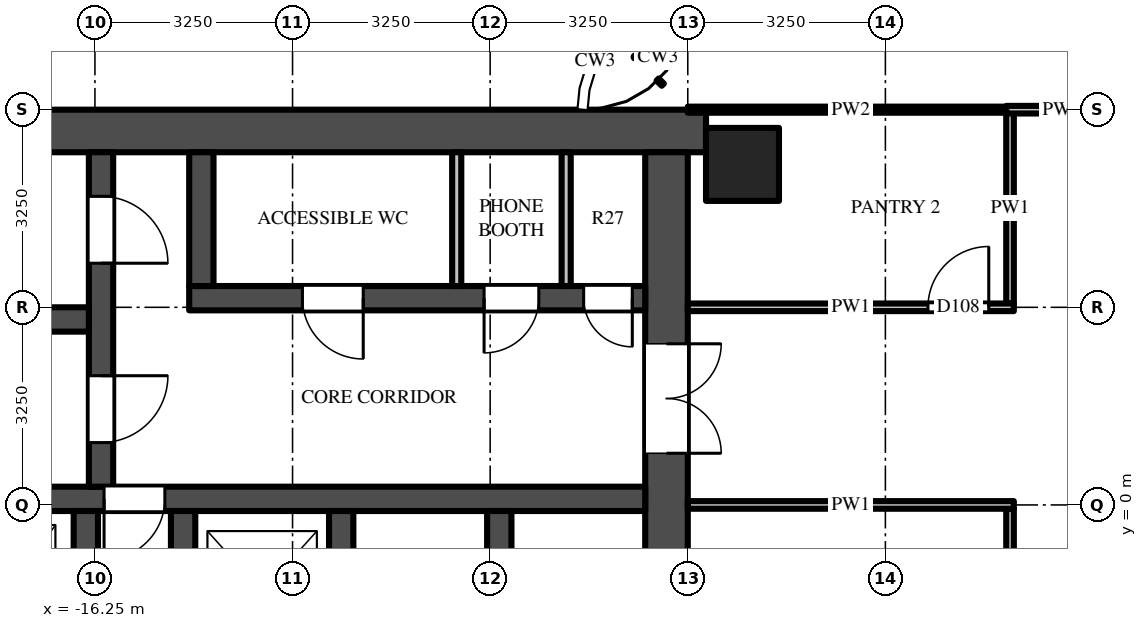
"""IFC4 building model, lengths in metres.
Left out: names, types, materials, properties, quantities, classifications, styles, units other than length and angle.
Written with IfcOpenShell. Run it as: python <this file> out.ifc"""

import sys

from ifc_helpers import new_model, si_unit, direction, frame, frame_2d, origin, origin_2d, place, context, subcontext, project, spatial, rectangle, extrude, source, transform, mapped, element, fill, save


model = new_model("IFC4")
c1 = context("Model", 3, precision=1e-05, world=origin(), true_north=direction((0.0, 1.0)))
c2 = subcontext(c1, "Body", "Model", "MODEL_VIEW")
j1 = project(units=[si_unit("LENGTHUNIT", "METRE"), si_unit("PLANEANGLEUNIT", "RADIAN")], contexts=[c1])
p1 = place(None, origin())
s1 = spatial("IfcSite", under=j1, at=p1, CompositionType="ELEMENT")
p2 = place(p1, origin())
s2 = spatial("IfcBuilding", under=s1, at=p2, CompositionType="ELEMENT")
p3 = place(p2, frame((0.0, 0.0, 185.4)))
s3 = spatial("IfcBuildingStorey", under=s2, at=p3, CompositionType="ELEMENT", Elevation=185.4)
m1 = source(origin(), c2, "Body", "SweptSolid", [
    extrude(rectangle(XDim=1.2, YDim=1.2, at=origin_2d()), origin(), (0.0, 0.0, 1.0), 3.9),
])
p4 = place(p3, frame((-5.6, 5.6, 0.0), z_axis=(0.0, 0.0, 1.0), x_axis=(1.0, 0.0, 0.0)))
e1 = element("IfcColumn", 1, at=p4, inside=s3, PredefinedType="COLUMN", context=c2, shape_type="MappedRepresentation", body=[
    mapped(m1, transform((0.0, 0.0, 0.0))),
])
m2 = source(origin(), c2, "Body", "SweptSolid", [
    extrude(rectangle(XDim=16.55, YDim=0.7, at=frame_2d((8.275, 0.0))), origin(), (0.0, 0.0, 1.0), 3.7),
])
p5 = place(p3, frame((-6.2, 6.15, 0.0), z_axis=(0.0, 0.0, 1.0), x_axis=(-1.0, 0.0, 0.0)))
e2 = element("IfcWall", 2, at=p5, inside=s3, PredefinedType="SHEAR", context=c2, shape_type="MappedRepresentation", body=[
    mapped(m2, transform((0.0, 0.0, 0.0))),
])
m3 = source(origin(), c2, "Body", "SweptSolid", [
    extrude(rectangle(XDim=9.05, YDim=0.7, at=frame_2d((4.525, 0.0))), origin(), (0.0, 0.0, 1.0), 3.7),
])
p6 = place(p3, frame((-6.85, 5.8, 0.0), z_axis=(0.0, 0.0, 1.0), x_axis=(0.0, -1.0, 0.0)))
e3 = element("IfcWall", 3, at=p6, inside=s3, PredefinedType="SHEAR", context=c2, shape_type="MappedRepresentation", body=[
    mapped(m3, transform((0.0, 0.0, 0.0))),
])
m4 = source(origin(), c2, "Body", "SweptSolid", [
    extrude(rectangle(XDim=1.8, YDim=2.1, at=frame_2d((0.9, 1.05))), frame((0.0, 0.36, 0.0), z_axis=(0.0, -1.0, 0.0), x_axis=(1.0, 0.0, 0.0)), (0.0, 0.0, 1.0), 0.72),
])
p7 = place(p6, frame((3.15, 0.0, 0.0)))
e4 = element("IfcOpeningElement", 4, at=p7, cuts=e3, PredefinedType="OPENING", context=c2, shape_type="MappedRepresentation", body=[
    mapped(m4, transform((0.0, 0.0, 0.0))),
])
m5 = source(origin(), c2, "Body", "SweptSolid", [
    extrude(rectangle(XDim=7.5, YDim=0.4, at=frame_2d((3.75, 0.0))), origin(), (0.0, 0.0, 1.0), 3.7),
])
p8 = place(p3, frame((-7.2, 3.4, 0.0), z_axis=(0.0, 0.0, 1.0), x_axis=(-1.0, 0.0, 0.0)))
e5 = element("IfcWall", 5, at=p8, inside=s3, PredefinedType="SHEAR", context=c2, shape_type="MappedRepresentation", body=[
    mapped(m5, transform((0.0, 0.0, 0.0))),
])
m6 = source(origin(), c2, "Body", "SweptSolid", [
    extrude(rectangle(XDim=0.8, YDim=2.1, at=frame_2d((0.4, 1.05))), frame((0.0, 0.21, 0.0), z_axis=(0.0, -1.0, 0.0), x_axis=(1.0, 0.0, 0.0)), (0.0, 0.0, 1.0), 0.42),
])
p9 = place(p8, frame((0.212, 0.0, 0.0)))
e6 = element("IfcOpeningElement", 6, at=p9, cuts=e5, PredefinedType="OPENING", context=c2, shape_type="MappedRepresentation", body=[
    mapped(m6, transform((0.0, 0.0, 0.0))),
])
m7 = source(origin(), c2, "Body", "SweptSolid", [
    extrude(rectangle(XDim=0.9, YDim=2.1, at=frame_2d((0.45, 1.05))), frame((0.0, 0.21, 0.0), z_axis=(0.0, -1.0, 0.0), x_axis=(1.0, 0.0, 0.0)), (0.0, 0.0, 1.0), 0.42),
])
p10 = place(p8, frame((1.75, 0.0, 0.0)))
e7 = element("IfcOpeningElement", 7, at=p10, cuts=e5, PredefinedType="OPENING", context=c2, shape_type="MappedRepresentation", body=[
    mapped(m7, transform((0.0, 0.0, 0.0))),
])
m8 = source(origin(), c2, "Body", "SweptSolid", [
    extrude(rectangle(XDim=1.0, YDim=2.1, at=frame_2d((0.5, 1.05))), frame((0.0, 0.21, 0.0), z_axis=(0.0, -1.0, 0.0), x_axis=(1.0, 0.0, 0.0)), (0.0, 0.0, 1.0), 0.42),
])
p11 = place(p8, frame((4.637, 0.0, 0.0)))
e8 = element("IfcOpeningElement", 8, at=p11, cuts=e5, PredefinedType="OPENING", context=c2, shape_type="MappedRepresentation", body=[
    mapped(m8, transform((0.0, 0.0, 0.0))),
])
m9 = source(origin(), c2, "Body", "SweptSolid", [
    extrude(rectangle(XDim=14.85, YDim=0.4, at=frame_2d((7.425, 0.0))), origin(), (0.0, 0.0, 1.0), 3.7),
])
p12 = place(p3, frame((-7.2, 0.1, 0.0), z_axis=(0.0, 0.0, 1.0), x_axis=(-1.0, 0.0, 0.0)))
e9 = element("IfcWall", 9, at=p12, inside=s3, PredefinedType="SHEAR", context=c2, shape_type="MappedRepresentation", body=[
    mapped(m9, transform((0.0, 0.0, 0.0))),
])
p13 = place(p12, frame((7.9, 0.0, 0.0)))
e10 = element("IfcOpeningElement", 10, at=p13, cuts=e9, PredefinedType="OPENING", context=c2, shape_type="MappedRepresentation", body=[
    mapped(m8, transform((0.0, 0.0, 0.0))),
])
m10 = source(origin(), c2, "Body", "SweptSolid", [
    extrude(rectangle(XDim=5.5, YDim=0.4, at=frame_2d((2.75, 0.0))), origin(), (0.0, 0.0, 1.0), 3.7),
])
p14 = place(p3, frame((-16.15, 5.8, 0.0), z_axis=(0.0, 0.0, 1.0), x_axis=(0.0, -1.0, 0.0)))
e11 = element("IfcWall", 11, at=p14, inside=s3, PredefinedType="SHEAR", context=c2, shape_type="MappedRepresentation", body=[
    mapped(m10, transform((0.0, 0.0, 0.0))),
])
m11 = source(origin(), c2, "Body", "SweptSolid", [
    extrude(rectangle(XDim=1.1, YDim=2.1, at=frame_2d((0.55, 1.05))), frame((0.0, 0.21, 0.0), z_axis=(0.0, -1.0, 0.0), x_axis=(1.0, 0.0, 0.0)), (0.0, 0.0, 1.0), 0.42),
])
p15 = place(p14, frame((0.725, 0.0, 0.0)))
e12 = element("IfcOpeningElement", 12, at=p15, cuts=e11, PredefinedType="OPENING", context=c2, shape_type="MappedRepresentation", body=[
    mapped(m11, transform((0.0, 0.0, 0.0))),
])
p16 = place(p14, frame((3.675, 0.0, 0.0)))
e13 = element("IfcOpeningElement", 13, at=p16, cuts=e11, PredefinedType="OPENING", context=c2, shape_type="MappedRepresentation", body=[
    mapped(m11, transform((0.0, 0.0, 0.0))),
])
m12 = source(origin(), c2, "Body", "SweptSolid", [
    extrude(rectangle(XDim=5.7, YDim=0.4, at=frame_2d((2.85, 0.0))), origin(), (0.0, 0.0, 1.0), 3.7),
])
p17 = place(p3, frame((-16.35, 3.05, 0.0), z_axis=(0.0, 0.0, 1.0), x_axis=(-1.0, 0.0, 0.0)))
e14 = element("IfcWall", 14, at=p17, inside=s3, PredefinedType="SHEAR", context=c2, shape_type="MappedRepresentation", body=[
    mapped(m12, transform((0.0, 0.0, 0.0))),
])
m13 = source(origin(), c2, "Body", "SweptSolid", [
    extrude(rectangle(XDim=2.2, YDim=0.4, at=frame_2d((1.1, 0.0))), origin(), (0.0, 0.0, 1.0), 3.7),
])
p18 = place(p3, frame((-14.5, 5.8, 0.0), z_axis=(0.0, 0.0, 1.0), x_axis=(0.0, -1.0, 0.0)))
e15 = element("IfcWall", 15, at=p18, inside=s3, PredefinedType="SHEAR", context=c2, shape_type="MappedRepresentation", body=[
    mapped(m13, transform((0.0, 0.0, 0.0))),
])
m14 = source(origin(), c2, "Body", "SweptSolid", [
    extrude(rectangle(XDim=2.45, YDim=0.4, at=frame_2d((1.225, 0.0))), origin(), (0.0, 0.0, 1.0), 3.7),
])
for number, where, z_axis, x_axis in (
    (16, (-9.6, -0.1, 0.0), (0.0, 0.0, 1.0), (0.0, -1.0, 0.0)),
    (17, (-12.2, -0.1, 0.0), (0.0, 0.0, 1.0), (0.0, -1.0, 0.0)),
    (18, (-14.8, -0.1, 0.0), (0.0, 0.0, 1.0), (0.0, -1.0, 0.0)),
    (19, (-16.4, -0.1, 0.0), (0.0, 0.0, 1.0), (0.0, -1.0, 0.0)),
):
    element("IfcWall", number, at=place(p3, frame(where, z_axis=z_axis, x_axis=x_axis)), inside=s3, PredefinedType="SHEAR", context=c2, shape_type="MappedRepresentation", body=[
        mapped(m14, transform((0.0, 0.0, 0.0))),
    ])
m15 = source(origin(), c2, "Body", "SweptSolid", [
    extrude(rectangle(XDim=2.2, YDim=0.15, at=frame_2d((1.1, 0.0))), origin(), (0.0, 0.0, 1.0), 3.7),
])
for number, where, z_axis, x_axis in (
    (20, (-8.5, 5.8, 0.0), (0.0, 0.0, 1.0), (0.0, -1.0, 0.0)),
    (21, (-10.3, 5.8, 0.0), (0.0, 0.0, 1.0), (0.0, -1.0, 0.0)),
):
    element("IfcWall", number, at=place(p3, frame(where, z_axis=z_axis, x_axis=x_axis)), inside=s3, PredefinedType="PARTITIONING", context=c2, shape_type="MappedRepresentation", body=[
        mapped(m15, transform((0.0, 0.0, 0.0))),
    ])
m16 = source(origin(), c2, "Body", "SweptSolid", [
    extrude(rectangle(XDim=3.125, YDim=0.125, at=frame_2d((1.562, 0.0))), origin(), (0.0, 0.0, 1.0), 3.068),
])
p19 = place(p3, frame((-1.2, -0.062, 0.0), z_axis=(0.0, 0.0, 1.0), x_axis=(0.0, -1.0, 0.0)))
e22 = element("IfcWall", 22, at=p19, inside=s3, PredefinedType="PARTITIONING", context=c2, shape_type="MappedRepresentation", body=[
    mapped(m16, transform((0.0, 0.0, 0.0))),
])
m17 = source(origin(), c2, "Body", "SweptSolid", [
    extrude(rectangle(XDim=3.137, YDim=0.125, at=frame_2d((1.569, 0.0))), origin(), (0.0, 0.0, 1.0), 2.997),
])
p20 = place(p3, frame((-1.2, 6.45, 0.0), z_axis=(0.0, 0.0, 1.0), x_axis=(0.0, -1.0, 0.0)))
e23 = element("IfcWall", 23, at=p20, inside=s3, PredefinedType="PARTITIONING", context=c2, shape_type="MappedRepresentation", body=[
    mapped(m17, transform((0.0, 0.0, 0.0))),
])
m18 = source(origin(), c2, "Body", "SweptSolid", [
    extrude(rectangle(XDim=5.363, YDim=0.125, at=frame_2d((2.681, 0.0))), origin(), (0.0, 0.0, 1.0), 2.997),
])
p21 = place(p3, frame((-1.137, 0.0, 0.0), z_axis=(0.0, 0.0, 1.0), x_axis=(-1.0, 0.0, 0.0)))
e24 = element("IfcWall", 24, at=p21, inside=s3, PredefinedType="PARTITIONING", context=c2, shape_type="MappedRepresentation", body=[
    mapped(m18, transform((0.0, 0.0, 0.0))),
])
p22 = place(p3, frame((-6.5, 3.25, 0.0), z_axis=(0.0, 0.0, 1.0), x_axis=(1.0, 0.0, 0.0)))
e25 = element("IfcWall", 25, at=p22, inside=s3, PredefinedType="PARTITIONING", context=c2, shape_type="MappedRepresentation", body=[
    mapped(m18, transform((0.0, 0.0, 0.0))),
])
m19 = source(origin(), c2, "Body", "SweptSolid", [
    extrude(rectangle(XDim=1.0, YDim=2.1, at=frame_2d((0.5, 1.05))), frame((0.0, 0.073, 0.0), z_axis=(0.0, -1.0, 0.0), x_axis=(1.0, 0.0, 0.0)), (0.0, 0.0, 1.0), 0.145),
])
p23 = place(p22, frame((3.95, 0.0, 0.0)))
e26 = element("IfcOpeningElement", 26, at=p23, cuts=e25, PredefinedType="OPENING", context=c2, shape_type="MappedRepresentation", body=[
    mapped(m19, transform((0.0, 0.0, 0.0))),
])
m20 = source(origin(), c2, "Body", "SweptSolid", [
    extrude(rectangle(XDim=5.363, YDim=0.1, at=frame_2d((2.681, 0.0))), origin(), (0.0, 0.0, 1.0), 2.78),
])
p24 = place(p3, frame((-6.5, 6.5, 0.0), z_axis=(0.0, 0.0, 1.0), x_axis=(1.0, 0.0, 0.0)))
e27 = element("IfcWall", 27, at=p24, inside=s3, PredefinedType="PARTITIONING", context=c2, shape_type="MappedRepresentation", body=[
    mapped(m20, transform((0.0, 0.0, 0.0))),
])
m21 = source(origin(), c2, "Body", "SweptSolid", [
    extrude(rectangle(XDim=1.825, YDim=0.125, at=frame_2d((0.913, 0.0))), origin(), (0.0, 0.0, 1.0), 3.7),
])
p25 = place(p3, frame((-1.262, 6.5, 0.0), z_axis=(0.0, 0.0, 1.0), x_axis=(1.0, 0.0, 0.0)))
e28 = element("IfcWall", 28, at=p25, inside=s3, PredefinedType="PARTITIONING", context=c2, shape_type="MappedRepresentation", body=[
    mapped(m21, transform((0.0, 0.0, 0.0))),
])
m22 = source(origin(), c2, "Body", "SweptSolid", [
    extrude(rectangle(XDim=1.8, YDim=2.1, at=frame_2d((0.9, 1.05))), frame((0.0, -0.275, 0.0), z_axis=(0.0, -1.0, 0.0), x_axis=(1.0, 0.0, 0.0)), (0.0, 0.0, 1.0), 0.05),
])
p26 = place(p7, origin())
e29 = element("IfcDoor", 29, at=p26, inside=s3, OperationType="DOUBLE_DOOR_SINGLE_SWING", PredefinedType="DOOR", context=c2, shape_type="MappedRepresentation", body=[
    mapped(m22, transform((0.0, 0.0, 0.0))),
])
fill(e4, e29)
m23 = source(origin(), c2, "Body", "SweptSolid", [
    extrude(rectangle(XDim=1.1, YDim=2.1, at=frame_2d((0.55, 1.05))), frame((0.0, 0.025, 0.0), z_axis=(0.0, -1.0, 0.0), x_axis=(1.0, 0.0, 0.0)), (0.0, 0.0, 1.0), 0.05),
])
p27 = place(p15, origin())
e30 = element("IfcDoor", 30, at=p27, inside=s3, OperationType="SINGLE_SWING_RIGHT", PredefinedType="DOOR", context=c2, shape_type="MappedRepresentation", body=[
    mapped(m23, transform((0.0, 0.0, 0.0))),
])
fill(e12, e30)
p28 = place(p16, origin())
e31 = element("IfcDoor", 31, at=p28, inside=s3, OperationType="SINGLE_SWING_LEFT", PredefinedType="DOOR", context=c2, shape_type="MappedRepresentation", body=[
    mapped(m23, transform((0.0, 0.0, 0.0))),
])
fill(e13, e31)
m24 = source(origin(), c2, "Body", "SweptSolid", [
    extrude(rectangle(XDim=1.0, YDim=2.1, at=frame_2d((0.5, 1.05))), frame((0.0, 0.025, 0.0), z_axis=(0.0, -1.0, 0.0), x_axis=(1.0, 0.0, 0.0)), (0.0, 0.0, 1.0), 0.05),
])
p29 = place(p13, origin())
e32 = element("IfcDoor", 32, at=p29, inside=s3, OperationType="SINGLE_SWING_RIGHT", PredefinedType="DOOR", context=c2, shape_type="MappedRepresentation", body=[
    mapped(m24, transform((0.0, 0.0, 0.0))),
])
fill(e10, e32)
m25 = source(origin(), c2, "Body", "SweptSolid", [
    extrude(rectangle(XDim=0.8, YDim=2.1, at=frame_2d((0.4, 1.05))), frame((0.0, 0.025, 0.0), z_axis=(0.0, -1.0, 0.0), x_axis=(1.0, 0.0, 0.0)), (0.0, 0.0, 1.0), 0.05),
])
p30 = place(p9, origin())
e33 = element("IfcDoor", 33, at=p30, inside=s3, OperationType="SINGLE_SWING_LEFT", PredefinedType="DOOR", context=c2, shape_type="MappedRepresentation", body=[
    mapped(m25, transform((0.0, 0.0, 0.0))),
])
fill(e6, e33)
m26 = source(origin(), c2, "Body", "SweptSolid", [
    extrude(rectangle(XDim=0.9, YDim=2.1, at=frame_2d((0.45, 1.05))), frame((0.0, 0.025, 0.0), z_axis=(0.0, -1.0, 0.0), x_axis=(1.0, 0.0, 0.0)), (0.0, 0.0, 1.0), 0.05),
])
p31 = place(p10, origin())
e34 = element("IfcDoor", 34, at=p31, inside=s3, OperationType="SINGLE_SWING_RIGHT", PredefinedType="DOOR", context=c2, shape_type="MappedRepresentation", body=[
    mapped(m26, transform((0.0, 0.0, 0.0))),
])
fill(e7, e34)
p32 = place(p11, origin())
e35 = element("IfcDoor", 35, at=p32, inside=s3, OperationType="SINGLE_SWING_LEFT", PredefinedType="DOOR", context=c2, shape_type="MappedRepresentation", body=[
    mapped(m24, transform((0.0, 0.0, 0.0))),
])
fill(e8, e35)
p33 = place(p23, origin())
e36 = element("IfcDoor", 36, at=p33, inside=s3, OperationType="SINGLE_SWING_RIGHT", PredefinedType="DOOR", context=c2, shape_type="MappedRepresentation", body=[
    mapped(m24, transform((0.0, 0.0, 0.0))),
])
fill(e26, e36)
save(model, sys.argv[1])
